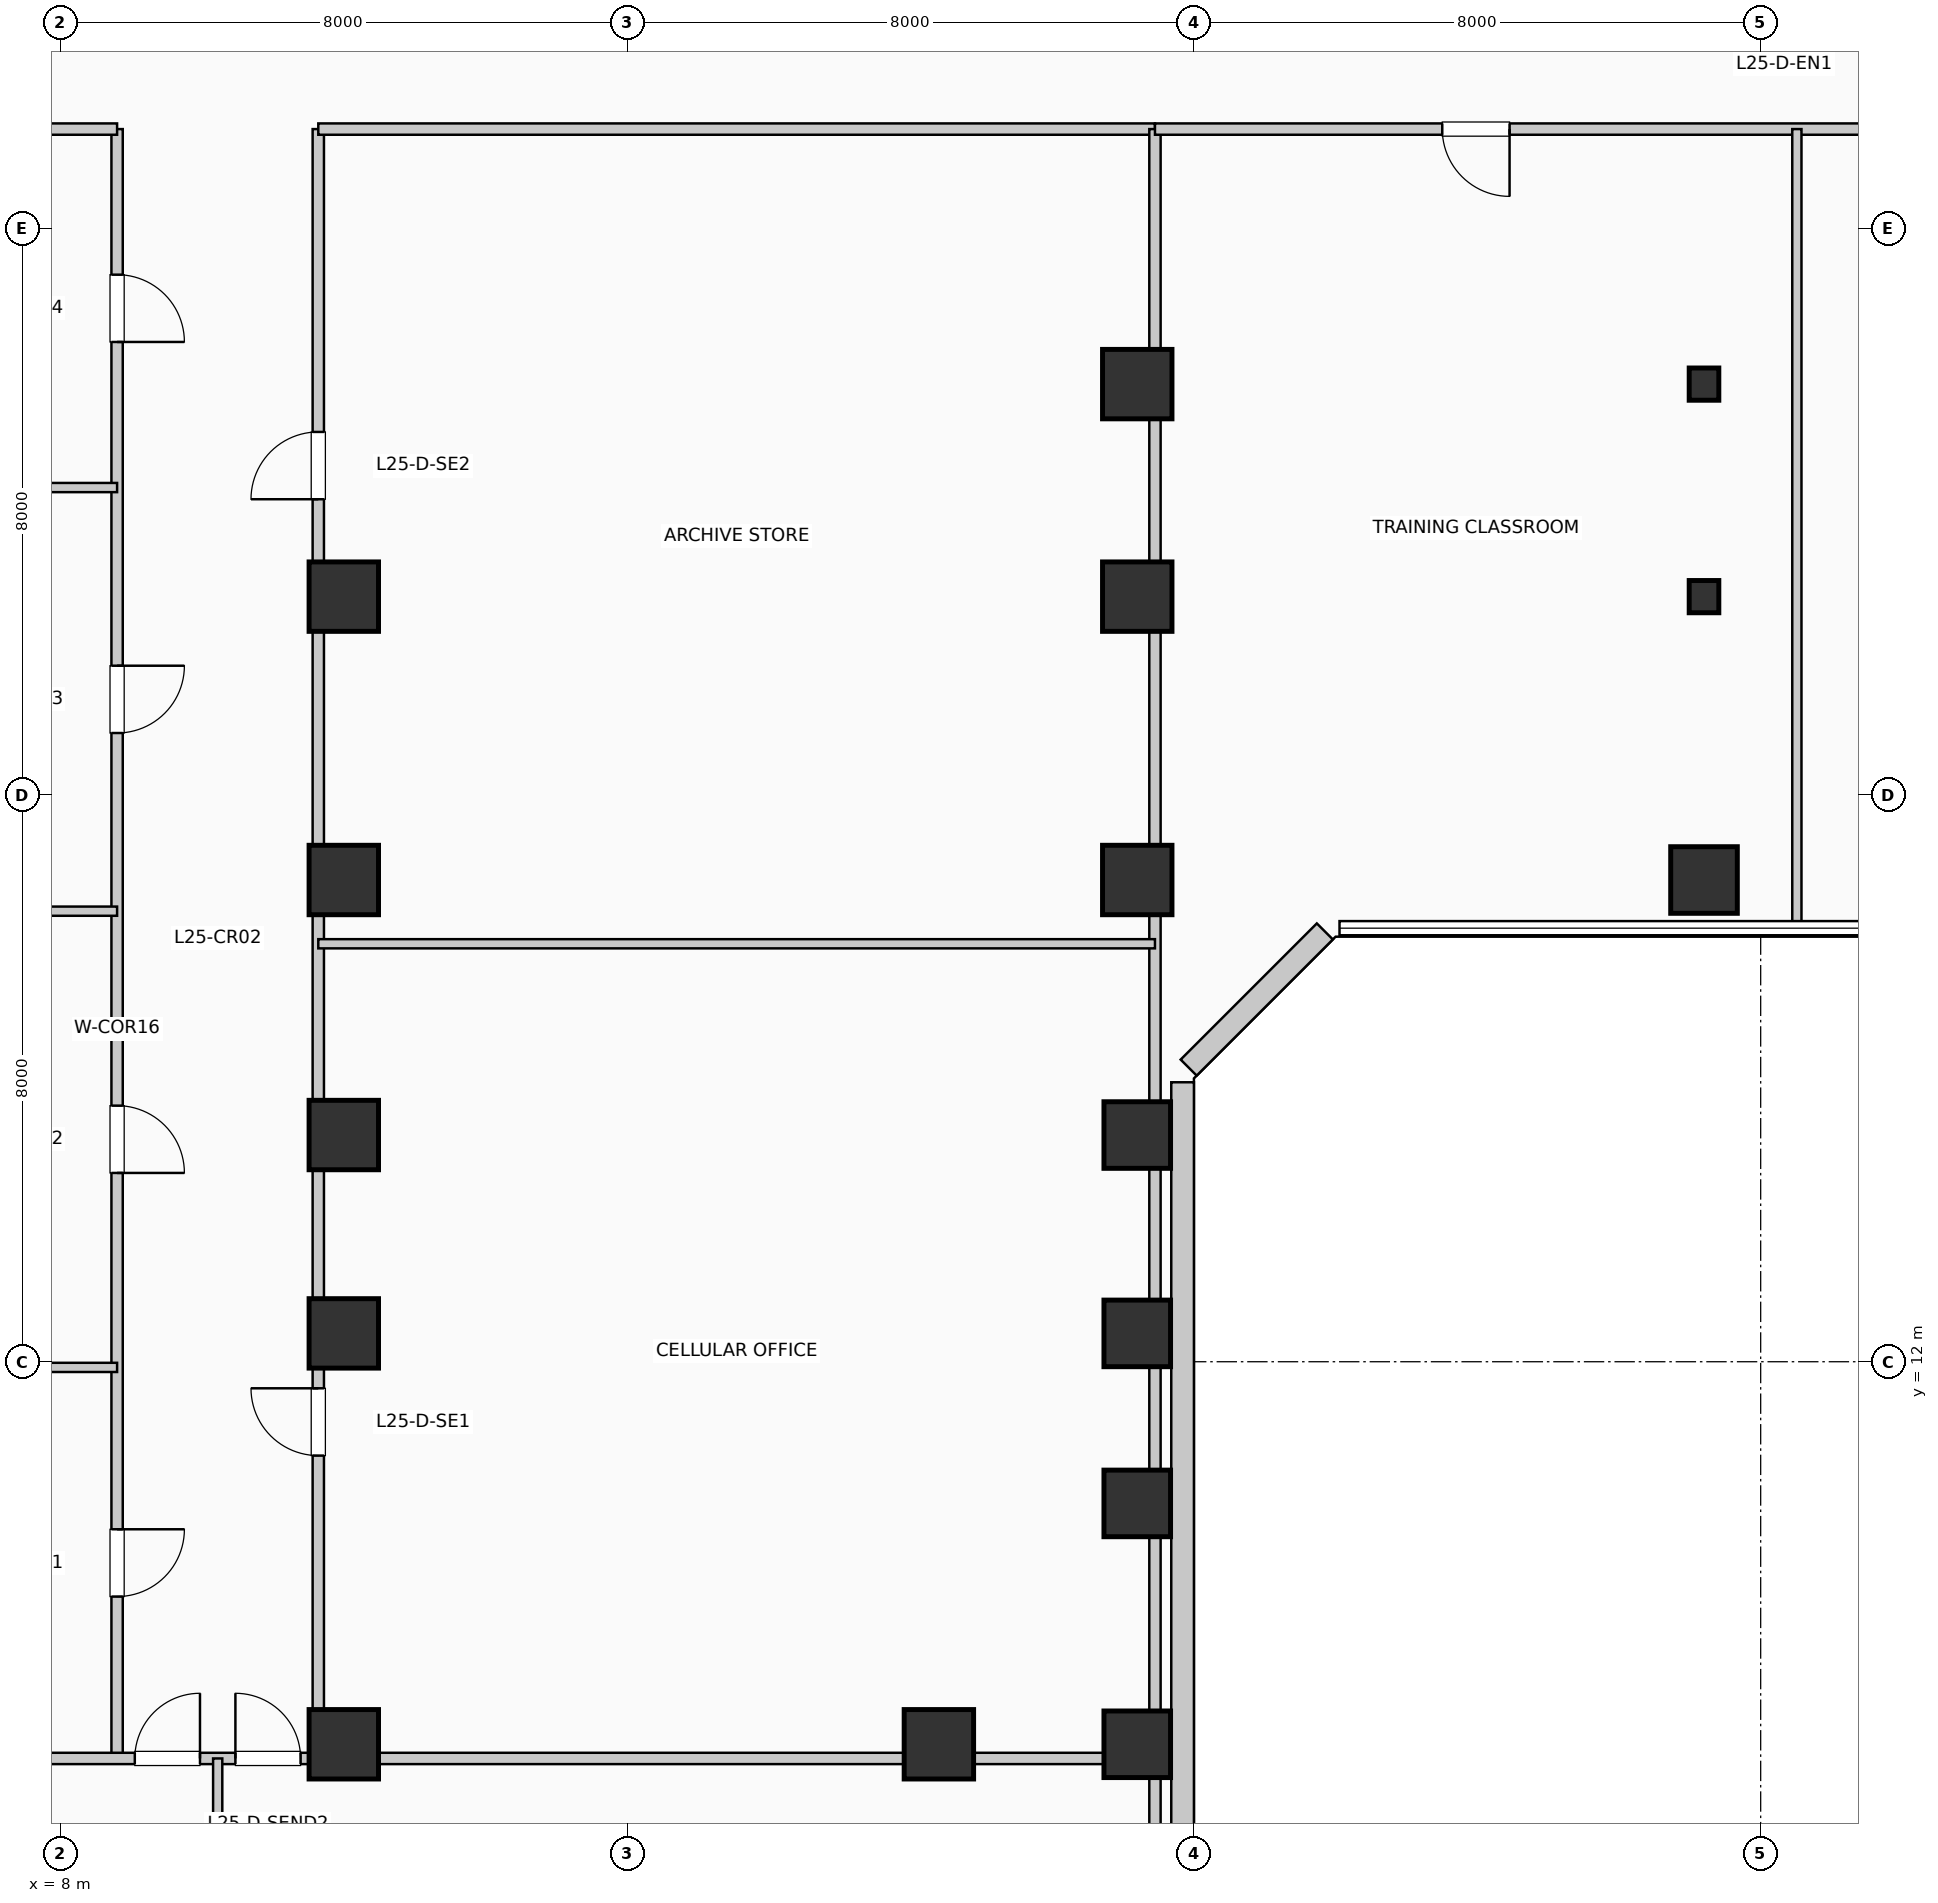
"""IFC4 building model, lengths in metres.
Left out: names, types, materials, properties, quantities, classifications, styles, units other than length and angle.
Written with IfcOpenShell. Run it as: python <this file> out.ifc"""

import sys

from ifc_helpers import new_model, si_unit, direction, frame, frame_2d, origin, origin_2d, place, context, subcontext, project, spatial, rectangle, i_section, extrude, element, fill, save


model = new_model("IFC4")
c1 = context("Model", 3, precision=1e-05, world=origin(), true_north=direction((0.0, 1.0)))
c2 = subcontext(c1, "Body", "Model", "MODEL_VIEW")
j1 = project(units=[si_unit("LENGTHUNIT", "METRE"), si_unit("PLANEANGLEUNIT", "RADIAN")], contexts=[c1])
p1 = place(None, origin())
s1 = spatial("IfcSite", under=j1, at=p1, CompositionType="ELEMENT")
p2 = place(p1, origin())
s2 = spatial("IfcBuilding", under=s1, at=p2, CompositionType="ELEMENT")
p3 = place(p2, frame((0.0, 0.0, 106.59)))
s3 = spatial("IfcBuildingStorey", under=s2, at=p3, CompositionType="ELEMENT", Elevation=106.59)
for number, where, z_axis, x_axis in (
    (1, (12.0, 6.6, 0.0), (0.0, 0.0, 1.0), (1.0, 0.0, 0.0)),
    (2, (12.0, 12.4, 0.0), (0.0, 0.0, 1.0), (1.0, 0.0, 0.0)),
    (3, (12.0, 15.2, 0.0), (0.0, 0.0, 1.0), (1.0, 0.0, 0.0)),
    (4, (12.0, 18.8, 0.0), (0.0, 0.0, 1.0), (1.0, 0.0, 0.0)),
    (5, (12.0, 22.8, 0.0), (0.0, 0.0, 1.0), (1.0, 0.0, 0.0)),
    (6, (20.4, 6.6, 0.0), (0.0, 0.0, 1.0), (1.0, 0.0, 0.0)),
):
    element("IfcColumn", number, at=place(p3, frame(where, z_axis=z_axis, x_axis=x_axis)), inside=s3, PredefinedType="COLUMN", context=c2, shape_type="SweptSolid", body=[
        extrude(rectangle(XDim=0.98, YDim=0.98, at=origin_2d()), origin(), (0.0, 0.0, 1.0), 3.96),
    ])
for number, where, z_axis, x_axis in (
    (7, (23.2, 6.6, 0.0), (0.0, 0.0, 1.0), (1.0, 0.0, 0.0)),
    (8, (23.2, 10.0, 0.0), (0.0, 0.0, 1.0), (1.0, 0.0, 0.0)),
    (9, (23.2, 12.4, 0.0), (0.0, 0.0, 1.0), (1.0, 0.0, 0.0)),
    (10, (23.2, 15.2, 0.0), (0.0, 0.0, 1.0), (1.0, 0.0, 0.0)),
):
    element("IfcColumn", number, at=place(p3, frame(where, z_axis=z_axis, x_axis=x_axis)), inside=s3, PredefinedType="COLUMN", context=c2, shape_type="SweptSolid", body=[
        extrude(rectangle(XDim=0.94, YDim=0.94, at=origin_2d()), origin(), (0.0, 0.0, 1.0), 3.96),
    ])
for number, where, z_axis, x_axis in (
    (11, (23.2, 18.8, 0.0), (0.0, 0.0, 1.0), (1.0, 0.0, 0.0)),
    (12, (23.2, 22.8, 0.0), (0.0, 0.0, 1.0), (1.0, 0.0, 0.0)),
    (13, (23.2, 25.8, 0.0), (0.0, 0.0, 1.0), (1.0, 0.0, 0.0)),
):
    element("IfcColumn", number, at=place(p3, frame(where, z_axis=z_axis, x_axis=x_axis)), inside=s3, PredefinedType="COLUMN", context=c2, shape_type="SweptSolid", body=[
        extrude(rectangle(XDim=0.98, YDim=0.98, at=origin_2d()), origin(), (0.0, 0.0, 1.0), 3.96),
    ])
p4 = place(p3, frame((31.2, 18.8, 0.0), z_axis=(0.0, 0.0, 1.0), x_axis=(1.0, 0.0, 0.0)))
e14 = element("IfcColumn", 14, at=p4, inside=s3, PredefinedType="COLUMN", context=c2, shape_type="SweptSolid", body=[
    extrude(rectangle(XDim=0.94, YDim=0.94, at=origin_2d()), origin(), (0.0, 0.0, 1.0), 3.96),
])
for number, where, z_axis, x_axis in (
    (15, (31.2, 22.8, 0.0), (0.0, 0.0, 1.0), (1.0, 0.0, 0.0)),
    (16, (31.2, 25.8, 0.0), (0.0, 0.0, 1.0), (1.0, 0.0, 0.0)),
):
    element("IfcColumn", number, at=place(p3, frame(where, z_axis=z_axis, x_axis=x_axis)), inside=s3, PredefinedType="COLUMN", context=c2, shape_type="SweptSolid", body=[
        extrude(i_section(OverallWidth=0.418, OverallDepth=0.455, WebThickness=0.032, FlangeThickness=0.051, at=origin_2d()), origin(), (0.0, 0.0, 1.0), 3.96),
    ])
p5 = place(p3, frame((23.84, 3.055, 0.0), z_axis=(0.0, 0.0, 1.0), x_axis=(0.0, 1.0, 0.0)))
e17 = element("IfcWall", 17, at=p5, inside=s3, PredefinedType="SOLIDWALL", context=c2, shape_type="SweptSolid", body=[
    extrude(rectangle(XDim=12.89, YDim=0.32, at=frame_2d((6.445, 0.0))), origin(), (0.0, 0.0, 1.0), 3.71),
])
p6 = place(p3, frame((23.926, 16.152, 0.0), z_axis=(0.0, 0.0, 1.0), x_axis=(0.707106781187, 0.707106781187, 0.0)))
e18 = element("IfcWall", 18, at=p6, inside=s3, PredefinedType="SOLIDWALL", context=c2, shape_type="SweptSolid", body=[
    extrude(rectangle(XDim=2.718, YDim=0.32, at=frame_2d((1.359, 0.0))), origin(), (0.0, 0.0, 1.0), 3.71),
])
p7 = place(p3, frame((8.8, 6.4, 0.0), z_axis=(0.0, 0.0, 1.0), x_axis=(0.0, 1.0, 0.0)))
e19 = element("IfcWall", 19, at=p7, inside=s3, PredefinedType="PARTITIONING", context=c2, shape_type="SweptSolid", body=[
    extrude(rectangle(XDim=23.0, YDim=0.16, at=frame_2d((11.5, 0.0))), origin(), (0.0, 0.0, 1.0), 3.71),
])
p8 = place(p7, frame((3.235, 0.0, 0.0), z_axis=(0.0, 0.0, 1.0), x_axis=(-1.0, 0.0, 0.0)))
e20 = element("IfcOpeningElement", 20, at=p8, cuts=e19, PredefinedType="OPENING", context=c2, shape_type="SweptSolid", body=[
    extrude(rectangle(XDim=0.95, YDim=2.15, at=frame_2d((0.475, 1.075))), frame((0.0, 0.09, 0.0), z_axis=(0.0, -1.0, 0.0), x_axis=(1.0, 0.0, 0.0)), (0.0, 0.0, 1.0), 0.18),
])
p9 = place(p7, frame((9.215, 0.0, 0.0), z_axis=(0.0, 0.0, 1.0), x_axis=(-1.0, 0.0, 0.0)))
e21 = element("IfcOpeningElement", 21, at=p9, cuts=e19, PredefinedType="OPENING", context=c2, shape_type="SweptSolid", body=[
    extrude(rectangle(XDim=0.95, YDim=2.15, at=frame_2d((0.475, 1.075))), frame((0.0, 0.09, 0.0), z_axis=(0.0, -1.0, 0.0), x_axis=(1.0, 0.0, 0.0)), (0.0, 0.0, 1.0), 0.18),
])
p10 = place(p7, frame((15.425, 0.0, 0.0), z_axis=(0.0, 0.0, 1.0), x_axis=(-1.0, 0.0, 0.0)))
e22 = element("IfcOpeningElement", 22, at=p10, cuts=e19, PredefinedType="OPENING", context=c2, shape_type="SweptSolid", body=[
    extrude(rectangle(XDim=0.95, YDim=2.15, at=frame_2d((0.475, 1.075))), frame((0.0, 0.09, 0.0), z_axis=(0.0, -1.0, 0.0), x_axis=(1.0, 0.0, 0.0)), (0.0, 0.0, 1.0), 0.18),
])
p11 = place(p7, frame((20.945, 0.0, 0.0), z_axis=(0.0, 0.0, 1.0), x_axis=(-1.0, 0.0, 0.0)))
e23 = element("IfcOpeningElement", 23, at=p11, cuts=e19, PredefinedType="OPENING", context=c2, shape_type="SweptSolid", body=[
    extrude(rectangle(XDim=0.95, YDim=2.15, at=frame_2d((0.475, 1.075))), frame((0.0, 0.09, 0.0), z_axis=(0.0, -1.0, 0.0), x_axis=(1.0, 0.0, 0.0)), (0.0, 0.0, 1.0), 0.18),
])
p12 = place(p3, frame((11.64, 6.4, 0.0), z_axis=(0.0, 0.0, 1.0), x_axis=(0.0, 1.0, 0.0)))
e24 = element("IfcWall", 24, at=p12, inside=s3, PredefinedType="PARTITIONING", context=c2, shape_type="SweptSolid", body=[
    extrude(rectangle(XDim=23.0, YDim=0.16, at=frame_2d((11.5, 0.0))), origin(), (0.0, 0.0, 1.0), 2.995),
])
p13 = place(p12, frame((4.275, 0.0, 0.0)))
e25 = element("IfcOpeningElement", 25, at=p13, cuts=e24, PredefinedType="OPENING", context=c2, shape_type="SweptSolid", body=[
    extrude(rectangle(XDim=0.95, YDim=2.15, at=frame_2d((0.475, 1.075))), frame((0.0, 0.09, 0.0), z_axis=(0.0, -1.0, 0.0), x_axis=(1.0, 0.0, 0.0)), (0.0, 0.0, 1.0), 0.18),
])
p14 = place(p12, frame((17.775, 0.0, 0.0)))
e26 = element("IfcOpeningElement", 26, at=p14, cuts=e24, PredefinedType="OPENING", context=c2, shape_type="SweptSolid", body=[
    extrude(rectangle(XDim=0.95, YDim=2.15, at=frame_2d((0.475, 1.075))), frame((0.0, 0.09, 0.0), z_axis=(0.0, -1.0, 0.0), x_axis=(1.0, 0.0, 0.0)), (0.0, 0.0, 1.0), 0.18),
])
p15 = place(p3, frame((0.19, 6.4, 0.0), z_axis=(0.0, 0.0, 1.0), x_axis=(1.0, 0.0, 0.0)))
e27 = element("IfcWall", 27, at=p15, inside=s3, PredefinedType="PARTITIONING", context=c2, shape_type="SweptSolid", body=[
    extrude(rectangle(XDim=23.26, YDim=0.16, at=frame_2d((11.63, 0.0))), origin(), (0.0, 0.0, 1.0), 2.995),
])
p16 = place(p15, frame((8.86, 0.0, 0.0)))
e28 = element("IfcOpeningElement", 28, at=p16, cuts=e27, PredefinedType="OPENING", context=c2, shape_type="SweptSolid", body=[
    extrude(rectangle(XDim=0.92, YDim=2.1, at=frame_2d((0.46, 1.05))), frame((0.0, 0.09, 0.0), z_axis=(0.0, -1.0, 0.0), x_axis=(1.0, 0.0, 0.0)), (0.0, 0.0, 1.0), 0.18),
])
p17 = place(p15, frame((10.28, 0.0, 0.0)))
e29 = element("IfcOpeningElement", 29, at=p17, cuts=e27, PredefinedType="OPENING", context=c2, shape_type="SweptSolid", body=[
    extrude(rectangle(XDim=0.92, YDim=2.1, at=frame_2d((0.46, 1.05))), frame((0.0, 0.09, 0.0), z_axis=(0.0, -1.0, 0.0), x_axis=(1.0, 0.0, 0.0)), (0.0, 0.0, 1.0), 0.18),
])
p18 = place(p3, frame((0.19, 29.4, 0.0), z_axis=(0.0, 0.0, 1.0), x_axis=(1.0, 0.0, 0.0)))
e30 = element("IfcWall", 30, at=p18, inside=s3, PredefinedType="PARTITIONING", context=c2, shape_type="SweptSolid", body=[
    extrude(rectangle(XDim=8.61, YDim=0.16, at=frame_2d((4.305, 0.0))), origin(), (0.0, 0.0, 1.0), 3.365),
])
p19 = place(p3, frame((11.64, 29.4, 0.0), z_axis=(0.0, 0.0, 1.0), x_axis=(1.0, 0.0, 0.0)))
e31 = element("IfcWall", 31, at=p19, inside=s3, PredefinedType="PARTITIONING", context=c2, shape_type="SweptSolid", body=[
    extrude(rectangle(XDim=11.81, YDim=0.16, at=frame_2d((5.905, 0.0))), origin(), (0.0, 0.0, 1.0), 3.71),
])
p20 = place(p3, frame((23.45, 0.19, 0.0), z_axis=(0.0, 0.0, 1.0), x_axis=(0.0, 1.0, 0.0)))
e32 = element("IfcWall", 32, at=p20, inside=s3, PredefinedType="PARTITIONING", context=c2, shape_type="SweptSolid", body=[
    extrude(rectangle(XDim=29.21, YDim=0.16, at=frame_2d((14.605, 0.0))), origin(), (0.0, 0.0, 1.0), 2.995),
])
p21 = place(p3, frame((10.22, 0.19, 0.0), z_axis=(0.0, 0.0, 1.0), x_axis=(0.0, 1.0, 0.0)))
e33 = element("IfcWall", 33, at=p21, inside=s3, PredefinedType="PARTITIONING", context=c2, shape_type="SweptSolid", body=[
    extrude(rectangle(XDim=6.21, YDim=0.13, at=frame_2d((3.105, 0.0))), origin(), (0.0, 0.0, 1.0), 3.71),
])
p22 = place(p3, frame((0.19, 11.92, 0.0), z_axis=(0.0, 0.0, 1.0), x_axis=(1.0, 0.0, 0.0)))
e34 = element("IfcWall", 34, at=p22, inside=s3, PredefinedType="PARTITIONING", context=c2, shape_type="SweptSolid", body=[
    extrude(rectangle(XDim=8.61, YDim=0.13, at=frame_2d((4.305, 0.0))), origin(), (0.0, 0.0, 1.0), 3.71),
])
p23 = place(p3, frame((0.19, 18.36, 0.0), z_axis=(0.0, 0.0, 1.0), x_axis=(1.0, 0.0, 0.0)))
e35 = element("IfcWall", 35, at=p23, inside=s3, PredefinedType="PARTITIONING", context=c2, shape_type="SweptSolid", body=[
    extrude(rectangle(XDim=8.61, YDim=0.13, at=frame_2d((4.305, 0.0))), origin(), (0.0, 0.0, 1.0), 2.995),
])
p24 = place(p3, frame((0.19, 24.34, 0.0), z_axis=(0.0, 0.0, 1.0), x_axis=(1.0, 0.0, 0.0)))
e36 = element("IfcWall", 36, at=p24, inside=s3, PredefinedType="PARTITIONING", context=c2, shape_type="SweptSolid", body=[
    extrude(rectangle(XDim=8.61, YDim=0.13, at=frame_2d((4.305, 0.0))), origin(), (0.0, 0.0, 1.0), 3.71),
])
p25 = place(p3, frame((11.64, 17.9, 0.0), z_axis=(0.0, 0.0, 1.0), x_axis=(1.0, 0.0, 0.0)))
e37 = element("IfcWall", 37, at=p25, inside=s3, PredefinedType="PARTITIONING", context=c2, shape_type="SweptSolid", body=[
    extrude(rectangle(XDim=11.81, YDim=0.13, at=frame_2d((5.905, 0.0))), origin(), (0.0, 0.0, 1.0), 3.71),
])
p26 = place(p3, frame((23.45, 29.4, 0.0), z_axis=(0.0, 0.0, 1.0), x_axis=(1.0, 0.0, 0.0)))
e38 = element("IfcWall", 38, at=p26, inside=s3, PredefinedType="PARTITIONING", context=c2, shape_type="SweptSolid", body=[
    extrude(rectangle(XDim=32.36, YDim=0.16, at=frame_2d((16.18, 0.0))), origin(), (0.0, 0.0, 1.0), 3.365),
])
p27 = place(p26, frame((5.005, 0.0, 0.0), z_axis=(0.0, 0.0, 1.0), x_axis=(-1.0, 0.0, 0.0)))
e39 = element("IfcOpeningElement", 39, at=p27, cuts=e38, PredefinedType="OPENING", context=c2, shape_type="SweptSolid", body=[
    extrude(rectangle(XDim=0.95, YDim=2.15, at=frame_2d((0.475, 1.075))), frame((0.0, 0.09, 0.0), z_axis=(0.0, -1.0, 0.0), x_axis=(1.0, 0.0, 0.0)), (0.0, 0.0, 1.0), 0.18),
])
p28 = place(p26, frame((14.39, 0.0, 0.0), z_axis=(0.0, 0.0, 1.0), x_axis=(-1.0, 0.0, 0.0)))
e40 = element("IfcOpeningElement", 40, at=p28, cuts=e38, PredefinedType="OPENING", context=c2, shape_type="SweptSolid", body=[
    extrude(rectangle(XDim=0.95, YDim=2.15, at=frame_2d((0.475, 1.075))), frame((0.0, 0.09, 0.0), z_axis=(0.0, -1.0, 0.0), x_axis=(1.0, 0.0, 0.0)), (0.0, 0.0, 1.0), 0.18),
])
p29 = place(p26, frame((23.289, 0.0, 0.0), z_axis=(0.0, 0.0, 1.0), x_axis=(-1.0, 0.0, 0.0)))
e41 = element("IfcOpeningElement", 41, at=p29, cuts=e38, PredefinedType="OPENING", context=c2, shape_type="SweptSolid", body=[
    extrude(rectangle(XDim=0.95, YDim=2.15, at=frame_2d((0.475, 1.075))), frame((0.0, 0.09, 0.0), z_axis=(0.0, -1.0, 0.0), x_axis=(1.0, 0.0, 0.0)), (0.0, 0.0, 1.0), 0.18),
])
p30 = place(p26, frame((30.084, 0.0, 0.0), z_axis=(0.0, 0.0, 1.0), x_axis=(-1.0, 0.0, 0.0)))
e42 = element("IfcOpeningElement", 42, at=p30, cuts=e38, PredefinedType="OPENING", context=c2, shape_type="SweptSolid", body=[
    extrude(rectangle(XDim=0.95, YDim=2.15, at=frame_2d((0.475, 1.075))), frame((0.0, 0.09, 0.0), z_axis=(0.0, -1.0, 0.0), x_axis=(1.0, 0.0, 0.0)), (0.0, 0.0, 1.0), 0.18),
])
p31 = place(p3, frame((32.511, 18.19, 0.0), z_axis=(0.0, 0.0, 1.0), x_axis=(0.0, 1.0, 0.0)))
e43 = element("IfcWall", 43, at=p31, inside=s3, PredefinedType="PARTITIONING", context=c2, shape_type="SweptSolid", body=[
    extrude(rectangle(XDim=11.21, YDim=0.13, at=frame_2d((5.605, 0.0))), origin(), (0.0, 0.0, 1.0), 3.71),
])
p32 = place(p16, origin())
e44 = element("IfcDoor", 44, at=p32, inside=s3, OperationType="SINGLE_SWING_RIGHT", PredefinedType="DOOR", context=c2, shape_type="SweptSolid", body=[
    extrude(rectangle(XDim=0.92, YDim=2.1, at=frame_2d((0.46, 1.05))), frame((0.0, 0.025, 0.0), z_axis=(0.0, -1.0, 0.0), x_axis=(1.0, 0.0, 0.0)), (0.0, 0.0, 1.0), 0.05),
])
fill(e28, e44)
p33 = place(p17, origin())
e45 = element("IfcDoor", 45, at=p33, inside=s3, OperationType="SINGLE_SWING_LEFT", PredefinedType="DOOR", context=c2, shape_type="SweptSolid", body=[
    extrude(rectangle(XDim=0.92, YDim=2.1, at=frame_2d((0.46, 1.05))), frame((0.0, 0.025, 0.0), z_axis=(0.0, -1.0, 0.0), x_axis=(1.0, 0.0, 0.0)), (0.0, 0.0, 1.0), 0.05),
])
fill(e29, e45)
p34 = place(p8, origin())
e46 = element("IfcDoor", 46, at=p34, inside=s3, OperationType="SINGLE_SWING_RIGHT", PredefinedType="DOOR", context=c2, shape_type="SweptSolid", body=[
    extrude(rectangle(XDim=0.95, YDim=2.15, at=frame_2d((0.475, 1.075))), frame((0.0, 0.025, 0.0), z_axis=(0.0, -1.0, 0.0), x_axis=(1.0, 0.0, 0.0)), (0.0, 0.0, 1.0), 0.05),
])
fill(e20, e46)
p35 = place(p9, origin())
e47 = element("IfcDoor", 47, at=p35, inside=s3, OperationType="SINGLE_SWING_LEFT", PredefinedType="DOOR", context=c2, shape_type="SweptSolid", body=[
    extrude(rectangle(XDim=0.95, YDim=2.15, at=frame_2d((0.475, 1.075))), frame((0.0, 0.025, 0.0), z_axis=(0.0, -1.0, 0.0), x_axis=(1.0, 0.0, 0.0)), (0.0, 0.0, 1.0), 0.05),
])
fill(e21, e47)
p36 = place(p10, origin())
e48 = element("IfcDoor", 48, at=p36, inside=s3, OperationType="SINGLE_SWING_RIGHT", PredefinedType="DOOR", context=c2, shape_type="SweptSolid", body=[
    extrude(rectangle(XDim=0.95, YDim=2.15, at=frame_2d((0.475, 1.075))), frame((0.0, 0.025, 0.0), z_axis=(0.0, -1.0, 0.0), x_axis=(1.0, 0.0, 0.0)), (0.0, 0.0, 1.0), 0.05),
])
fill(e22, e48)
p37 = place(p11, origin())
e49 = element("IfcDoor", 49, at=p37, inside=s3, OperationType="SINGLE_SWING_LEFT", PredefinedType="DOOR", context=c2, shape_type="SweptSolid", body=[
    extrude(rectangle(XDim=0.95, YDim=2.15, at=frame_2d((0.475, 1.075))), frame((0.0, 0.025, 0.0), z_axis=(0.0, -1.0, 0.0), x_axis=(1.0, 0.0, 0.0)), (0.0, 0.0, 1.0), 0.05),
])
fill(e23, e49)
p38 = place(p13, origin())
e50 = element("IfcDoor", 50, at=p38, inside=s3, OperationType="SINGLE_SWING_RIGHT", PredefinedType="DOOR", context=c2, shape_type="SweptSolid", body=[
    extrude(rectangle(XDim=0.95, YDim=2.15, at=frame_2d((0.475, 1.075))), frame((0.0, 0.025, 0.0), z_axis=(0.0, -1.0, 0.0), x_axis=(1.0, 0.0, 0.0)), (0.0, 0.0, 1.0), 0.05),
])
fill(e25, e50)
p39 = place(p14, origin())
e51 = element("IfcDoor", 51, at=p39, inside=s3, OperationType="SINGLE_SWING_LEFT", PredefinedType="DOOR", context=c2, shape_type="SweptSolid", body=[
    extrude(rectangle(XDim=0.95, YDim=2.15, at=frame_2d((0.475, 1.075))), frame((0.0, 0.025, 0.0), z_axis=(0.0, -1.0, 0.0), x_axis=(1.0, 0.0, 0.0)), (0.0, 0.0, 1.0), 0.05),
])
fill(e26, e51)
p40 = place(p27, origin())
e52 = element("IfcDoor", 52, at=p40, inside=s3, OperationType="SINGLE_SWING_RIGHT", PredefinedType="DOOR", context=c2, shape_type="SweptSolid", body=[
    extrude(rectangle(XDim=0.95, YDim=2.15, at=frame_2d((0.475, 1.075))), frame((0.0, 0.025, 0.0), z_axis=(0.0, -1.0, 0.0), x_axis=(1.0, 0.0, 0.0)), (0.0, 0.0, 1.0), 0.05),
])
fill(e39, e52)
save(model, sys.argv[1])
